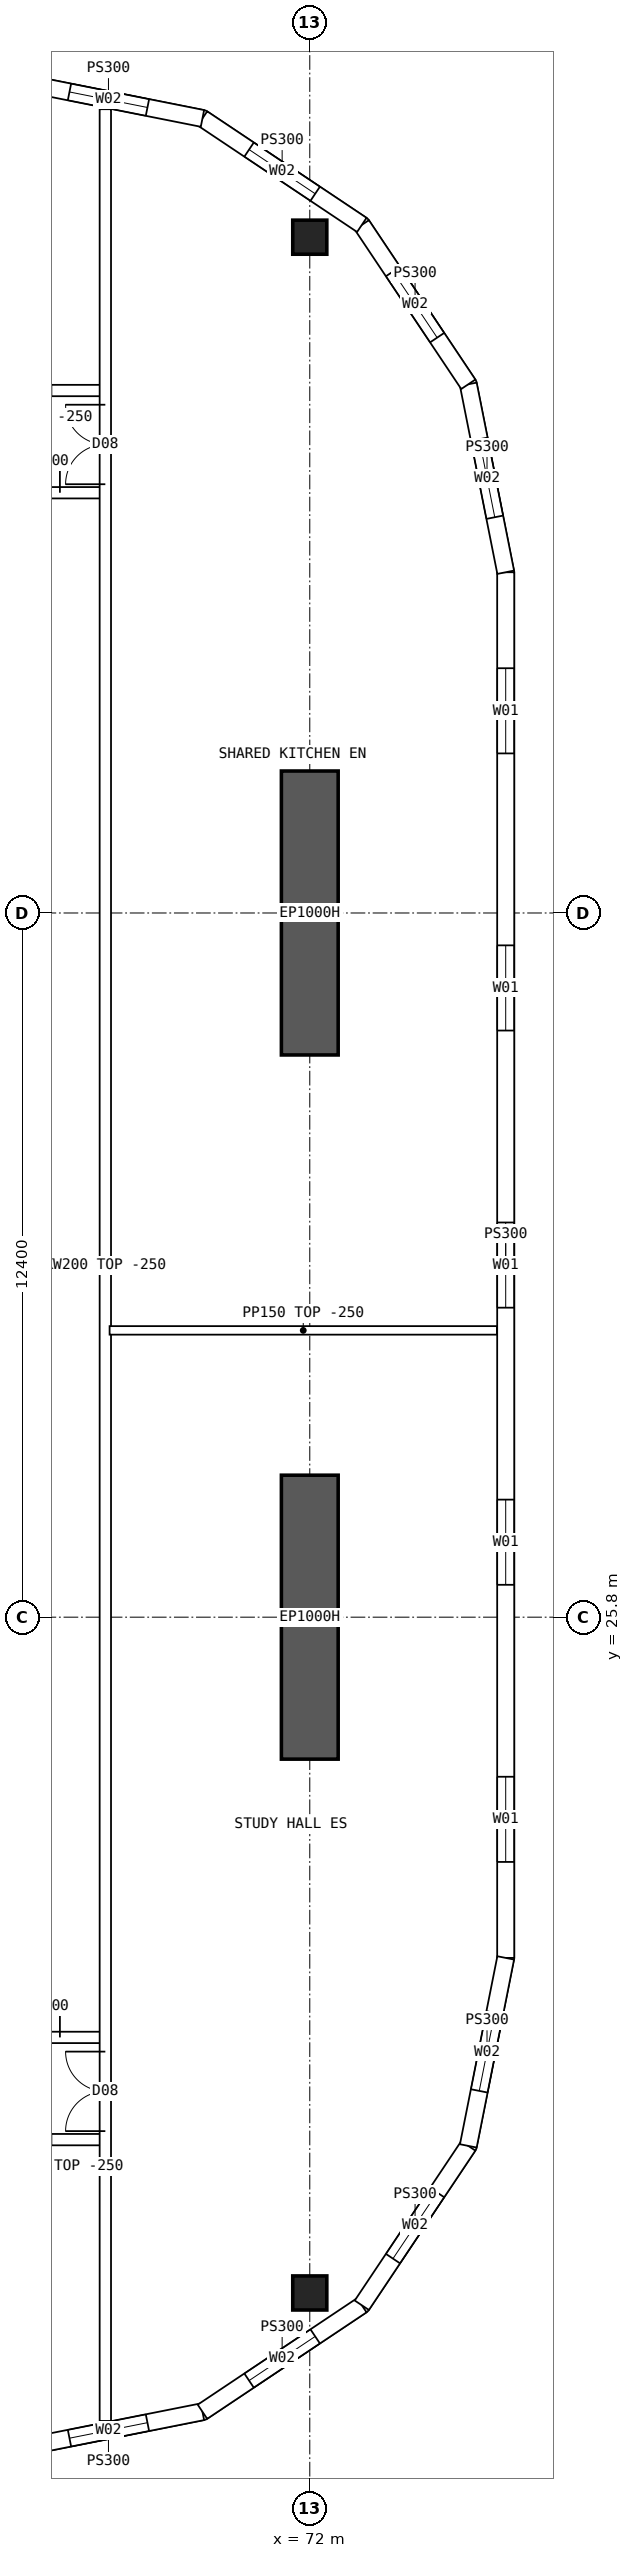
"""IFC4 building model, lengths in metres.
Left out: names, types, materials, properties, quantities, classifications, styles, units other than length and angle.
Written with IfcOpenShell. Run it as: python <this file> out.ifc"""

import sys

from ifc_helpers import new_model, si_unit, direction, frame, frame_2d, origin, origin_2d, place, context, subcontext, project, spatial, polyline, rectangle, hollow_rectangle, outline, extrude, element, fill, save


model = new_model("IFC4")
c1 = context("Model", 3, precision=1e-05, world=origin(), true_north=direction((0.0, 1.0)))
c2 = subcontext(c1, "Body", "Model", "MODEL_VIEW")
j1 = project(units=[si_unit("LENGTHUNIT", "METRE"), si_unit("PLANEANGLEUNIT", "RADIAN")], contexts=[c1])
p1 = place(None, origin())
s1 = spatial("IfcSite", under=j1, at=p1, CompositionType="ELEMENT")
p2 = place(p1, origin())
s2 = spatial("IfcBuilding", under=s1, at=p2, CompositionType="ELEMENT")
p3 = place(p2, frame((0.0, 0.0, 246.55)))
s3 = spatial("IfcBuildingStorey", under=s2, at=p3, CompositionType="ELEMENT", Elevation=246.55)
for number, where, z_axis, x_axis in (
    (1, (72.0, 13.9, 0.0), (0.0, 0.0, 1.0), (1.0, 0.0, 0.0)),
    (2, (72.0, 50.1, 0.0), (0.0, 0.0, 1.0), (1.0, 0.0, 0.0)),
):
    element("IfcColumn", number, at=place(p3, frame(where, z_axis=z_axis, x_axis=x_axis)), inside=s3, PredefinedType="COLUMN", context=c2, shape_type="SweptSolid", body=[
        extrude(hollow_rectangle(XDim=0.6, YDim=0.6, WallThickness=0.06, at=origin_2d()), origin(), (0.0, 0.0, 1.0), 3.75),
    ])
for number, where, z_axis, x_axis in (
    (3, (72.0, 23.3, 0.0), (0.0, 0.0, 1.0), (0.0, 1.0, 0.0)),
    (4, (72.0, 35.7, 0.0), (0.0, 0.0, 1.0), (0.0, 1.0, 0.0)),
):
    element("IfcWall", number, at=place(p3, frame(where, z_axis=z_axis, x_axis=x_axis)), inside=s3, PredefinedType="SHEAR", context=c2, shape_type="SweptSolid", body=[
        extrude(rectangle(XDim=5.0, YDim=1.0, at=frame_2d((2.5, 0.0))), origin(), (0.0, 0.0, 1.0), 3.75),
    ])
p4 = place(p3, frame((75.45, 19.8, 0.0), z_axis=(0.0, 0.0, 1.0), x_axis=(0.0, 1.0, 0.0)))
e5 = element("IfcWall", 5, at=p4, inside=s3, PredefinedType="SOLIDWALL", context=c2, shape_type="SweptSolid", body=[
    extrude(outline(polyline([(-0.015, -0.15), (24.415, -0.15), (24.385, 0.15), (0.015, 0.15), (-0.015, -0.15)])), origin(), (0.0, 0.0, 1.0), 3.5),
])
p5 = place(p4, frame((1.69, 0.0, 0.9)))
e6 = element("IfcOpeningElement", 6, at=p5, cuts=e5, PredefinedType="OPENING", context=c2, shape_type="SweptSolid", body=[
    extrude(rectangle(XDim=1.5, YDim=2.0, at=frame_2d((0.75, 1.0))), frame((0.0, 0.16, 0.0), z_axis=(0.0, -1.0, 0.0), x_axis=(1.0, 0.0, 0.0)), (0.0, 0.0, 1.0), 0.32),
])
p6 = place(p4, frame((6.57, 0.0, 0.9)))
e7 = element("IfcOpeningElement", 7, at=p6, cuts=e5, PredefinedType="OPENING", context=c2, shape_type="SweptSolid", body=[
    extrude(rectangle(XDim=1.5, YDim=2.0, at=frame_2d((0.75, 1.0))), frame((0.0, 0.16, 0.0), z_axis=(0.0, -1.0, 0.0), x_axis=(1.0, 0.0, 0.0)), (0.0, 0.0, 1.0), 0.32),
])
p7 = place(p4, frame((11.45, 0.0, 0.9)))
e8 = element("IfcOpeningElement", 8, at=p7, cuts=e5, PredefinedType="OPENING", context=c2, shape_type="SweptSolid", body=[
    extrude(rectangle(XDim=1.5, YDim=2.0, at=frame_2d((0.75, 1.0))), frame((0.0, 0.16, 0.0), z_axis=(0.0, -1.0, 0.0), x_axis=(1.0, 0.0, 0.0)), (0.0, 0.0, 1.0), 0.32),
])
p8 = place(p4, frame((16.33, 0.0, 0.9)))
e9 = element("IfcOpeningElement", 9, at=p8, cuts=e5, PredefinedType="OPENING", context=c2, shape_type="SweptSolid", body=[
    extrude(rectangle(XDim=1.5, YDim=2.0, at=frame_2d((0.75, 1.0))), frame((0.0, 0.16, 0.0), z_axis=(0.0, -1.0, 0.0), x_axis=(1.0, 0.0, 0.0)), (0.0, 0.0, 1.0), 0.32),
])
p9 = place(p4, frame((21.21, 0.0, 0.9)))
e10 = element("IfcOpeningElement", 10, at=p9, cuts=e5, PredefinedType="OPENING", context=c2, shape_type="SweptSolid", body=[
    extrude(rectangle(XDim=1.5, YDim=2.0, at=frame_2d((0.75, 1.0))), frame((0.0, 0.16, 0.0), z_axis=(0.0, -1.0, 0.0), x_axis=(1.0, 0.0, 0.0)), (0.0, 0.0, 1.0), 0.32),
])
p10 = place(p3, frame((66.8, 11.15, 0.0), z_axis=(0.0, 0.0, 1.0), x_axis=(0.98078325777, 0.195100490205, 0.0)))
e11 = element("IfcWall", 11, at=p10, inside=s3, PredefinedType="SOLIDWALL", context=c2, shape_type="SweptSolid", body=[
    extrude(outline(polyline([(-0.03, -0.15), (3.405, -0.15), (3.345, 0.15), (0.03, 0.15), (-0.03, -0.15)])), origin(), (0.0, 0.0, 1.0), 3.5),
])
p11 = place(p10, frame((0.988, 0.0, 0.9)))
e12 = element("IfcOpeningElement", 12, at=p11, cuts=e11, PredefinedType="OPENING", context=c2, shape_type="SweptSolid", body=[
    extrude(rectangle(XDim=1.4, YDim=1.8, at=frame_2d((0.7, 0.9))), frame((0.0, 0.16, 0.0), z_axis=(0.0, -1.0, 0.0), x_axis=(1.0, 0.0, 0.0)), (0.0, 0.0, 1.0), 0.32),
])
p12 = place(p3, frame((70.11, 11.808, 0.0), z_axis=(0.0, 0.0, 1.0), x_axis=(0.831460037396, 0.555584562613, 0.0)))
e13 = element("IfcWall", 13, at=p12, inside=s3, PredefinedType="SOLIDWALL", context=c2, shape_type="SweptSolid", body=[
    extrude(outline(polyline([(-0.03, -0.15), (3.405, -0.15), (3.345, 0.15), (0.03, 0.15), (-0.03, -0.15)])), origin(), (0.0, 0.0, 1.0), 3.5),
])
p13 = place(p12, frame((0.988, 0.0, 0.9)))
e14 = element("IfcOpeningElement", 14, at=p13, cuts=e13, PredefinedType="OPENING", context=c2, shape_type="SweptSolid", body=[
    extrude(rectangle(XDim=1.4, YDim=1.8, at=frame_2d((0.7, 0.9))), frame((0.0, 0.16, 0.0), z_axis=(0.0, -1.0, 0.0), x_axis=(1.0, 0.0, 0.0)), (0.0, 0.0, 1.0), 0.32),
])
p14 = place(p3, frame((72.917, 13.684, 0.0), z_axis=(0.0, 0.0, 1.0), x_axis=(0.555567969291, 0.831471124873, 0.0)))
e15 = element("IfcWall", 15, at=p14, inside=s3, PredefinedType="SOLIDWALL", context=c2, shape_type="SweptSolid", body=[
    extrude(outline(polyline([(-0.03, -0.15), (3.405, -0.15), (3.345, 0.15), (0.03, 0.15), (-0.03, -0.15)])), origin(), (0.0, 0.0, 1.0), 3.5),
])
p15 = place(p14, frame((0.988, 0.0, 0.9)))
e16 = element("IfcOpeningElement", 16, at=p15, cuts=e15, PredefinedType="OPENING", context=c2, shape_type="SweptSolid", body=[
    extrude(rectangle(XDim=1.4, YDim=1.8, at=frame_2d((0.7, 0.9))), frame((0.0, 0.16, 0.0), z_axis=(0.0, -1.0, 0.0), x_axis=(1.0, 0.0, 0.0)), (0.0, 0.0, 1.0), 0.32),
])
p16 = place(p3, frame((74.792, 16.49, 0.0), z_axis=(0.0, 0.0, 1.0), x_axis=(0.19508664885, 0.980786011034, 0.0)))
e17 = element("IfcWall", 17, at=p16, inside=s3, PredefinedType="SOLIDWALL", context=c2, shape_type="SweptSolid", body=[
    extrude(outline(polyline([(-0.03, -0.15), (3.39, -0.15), (3.36, 0.15), (0.03, 0.15), (-0.03, -0.15)])), origin(), (0.0, 0.0, 1.0), 3.5),
])
p17 = place(p16, frame((0.988, 0.0, 0.9)))
e18 = element("IfcOpeningElement", 18, at=p17, cuts=e17, PredefinedType="OPENING", context=c2, shape_type="SweptSolid", body=[
    extrude(rectangle(XDim=1.4, YDim=1.8, at=frame_2d((0.7, 0.9))), frame((0.0, 0.16, 0.0), z_axis=(0.0, -1.0, 0.0), x_axis=(1.0, 0.0, 0.0)), (0.0, 0.0, 1.0), 0.32),
])
p18 = place(p3, frame((75.45, 44.2, 0.0), z_axis=(0.0, 0.0, 1.0), x_axis=(-0.19508664885, 0.980786011034, 0.0)))
e19 = element("IfcWall", 19, at=p18, inside=s3, PredefinedType="SOLIDWALL", context=c2, shape_type="SweptSolid", body=[
    extrude(outline(polyline([(-0.015, -0.15), (3.405, -0.15), (3.345, 0.15), (0.015, 0.15), (-0.015, -0.15)])), origin(), (0.0, 0.0, 1.0), 3.5),
])
p19 = place(p18, frame((0.988, 0.0, 0.9)))
e20 = element("IfcOpeningElement", 20, at=p19, cuts=e19, PredefinedType="OPENING", context=c2, shape_type="SweptSolid", body=[
    extrude(rectangle(XDim=1.4, YDim=1.8, at=frame_2d((0.7, 0.9))), frame((0.0, 0.16, 0.0), z_axis=(0.0, -1.0, 0.0), x_axis=(1.0, 0.0, 0.0)), (0.0, 0.0, 1.0), 0.32),
])
p20 = place(p3, frame((74.792, 47.51, 0.0), z_axis=(0.0, 0.0, 1.0), x_axis=(-0.555567969291, 0.831471124873, 0.0)))
e21 = element("IfcWall", 21, at=p20, inside=s3, PredefinedType="SOLIDWALL", context=c2, shape_type="SweptSolid", body=[
    extrude(outline(polyline([(-0.03, -0.15), (3.405, -0.15), (3.345, 0.15), (0.03, 0.15), (-0.03, -0.15)])), origin(), (0.0, 0.0, 1.0), 3.5),
])
p21 = place(p20, frame((0.988, 0.0, 0.9)))
e22 = element("IfcOpeningElement", 22, at=p21, cuts=e21, PredefinedType="OPENING", context=c2, shape_type="SweptSolid", body=[
    extrude(rectangle(XDim=1.4, YDim=1.8, at=frame_2d((0.7, 0.9))), frame((0.0, 0.16, 0.0), z_axis=(0.0, -1.0, 0.0), x_axis=(1.0, 0.0, 0.0)), (0.0, 0.0, 1.0), 0.32),
])
p22 = place(p3, frame((72.917, 50.316, 0.0), z_axis=(0.0, 0.0, 1.0), x_axis=(-0.831460037396, 0.555584562613, 0.0)))
e23 = element("IfcWall", 23, at=p22, inside=s3, PredefinedType="SOLIDWALL", context=c2, shape_type="SweptSolid", body=[
    extrude(outline(polyline([(-0.03, -0.15), (3.405, -0.15), (3.345, 0.15), (0.03, 0.15), (-0.03, -0.15)])), origin(), (0.0, 0.0, 1.0), 3.5),
])
p23 = place(p22, frame((0.988, 0.0, 0.9)))
e24 = element("IfcOpeningElement", 24, at=p23, cuts=e23, PredefinedType="OPENING", context=c2, shape_type="SweptSolid", body=[
    extrude(rectangle(XDim=1.4, YDim=1.8, at=frame_2d((0.7, 0.9))), frame((0.0, 0.16, 0.0), z_axis=(0.0, -1.0, 0.0), x_axis=(1.0, 0.0, 0.0)), (0.0, 0.0, 1.0), 0.32),
])
p24 = place(p3, frame((70.11, 52.192, 0.0), z_axis=(0.0, 0.0, 1.0), x_axis=(-0.98078325777, 0.195100490205, 0.0)))
e25 = element("IfcWall", 25, at=p24, inside=s3, PredefinedType="SOLIDWALL", context=c2, shape_type="SweptSolid", body=[
    extrude(outline(polyline([(-0.03, -0.15), (3.405, -0.15), (3.345, 0.15), (0.03, 0.15), (-0.03, -0.15)])), origin(), (0.0, 0.0, 1.0), 3.5),
])
p25 = place(p24, frame((0.988, 0.0, 0.9)))
e26 = element("IfcOpeningElement", 26, at=p25, cuts=e25, PredefinedType="OPENING", context=c2, shape_type="SweptSolid", body=[
    extrude(rectangle(XDim=1.4, YDim=1.8, at=frame_2d((0.7, 0.9))), frame((0.0, 0.16, 0.0), z_axis=(0.0, -1.0, 0.0), x_axis=(1.0, 0.0, 0.0)), (0.0, 0.0, 1.0), 0.32),
])
p26 = place(p3, frame((66.35, 16.6, 0.0), z_axis=(0.0, 0.0, 1.0), x_axis=(1.0, 0.0, 0.0)))
e27 = element("IfcWall", 27, at=p26, inside=s3, PredefinedType="SOLIDWALL", context=c2, shape_type="SweptSolid", body=[
    extrude(rectangle(XDim=2.05, YDim=0.2, at=frame_2d((1.025, 0.0))), origin(), (0.0, 0.0, 1.0), 3.5),
])
p27 = place(p26, frame((0.2, 0.0, 0.0)))
e28 = element("IfcOpeningElement", 28, at=p27, cuts=e27, PredefinedType="OPENING", context=c2, shape_type="SweptSolid", body=[
    extrude(rectangle(XDim=0.9, YDim=2.1, at=frame_2d((0.45, 1.05))), frame((0.0, 0.11, 0.0), z_axis=(0.0, -1.0, 0.0), x_axis=(1.0, 0.0, 0.0)), (0.0, 0.0, 1.0), 0.22),
])
p28 = place(p3, frame((66.35, 18.4, 0.0), z_axis=(0.0, 0.0, 1.0), x_axis=(1.0, 0.0, 0.0)))
e29 = element("IfcWall", 29, at=p28, inside=s3, PredefinedType="SOLIDWALL", context=c2, shape_type="SweptSolid", body=[
    extrude(rectangle(XDim=2.05, YDim=0.2, at=frame_2d((1.025, 0.0))), origin(), (0.0, 0.0, 1.0), 3.5),
])
p29 = place(p28, frame((0.05, 0.0, 0.0)))
e30 = element("IfcOpeningElement", 30, at=p29, cuts=e29, PredefinedType="OPENING", context=c2, shape_type="SweptSolid", body=[
    extrude(rectangle(XDim=1.2, YDim=2.1, at=frame_2d((0.6, 1.05))), frame((0.0, 0.11, 0.0), z_axis=(0.0, -1.0, 0.0), x_axis=(1.0, 0.0, 0.0)), (0.0, 0.0, 1.0), 0.22),
])
p30 = place(p3, frame((66.35, 47.4, 0.0), z_axis=(0.0, 0.0, 1.0), x_axis=(1.0, 0.0, 0.0)))
e31 = element("IfcWall", 31, at=p30, inside=s3, PredefinedType="SOLIDWALL", context=c2, shape_type="SweptSolid", body=[
    extrude(rectangle(XDim=2.05, YDim=0.2, at=frame_2d((1.025, 0.0))), origin(), (0.0, 0.0, 1.0), 3.5),
])
p31 = place(p30, frame((0.2, 0.0, 0.0)))
e32 = element("IfcOpeningElement", 32, at=p31, cuts=e31, PredefinedType="OPENING", context=c2, shape_type="SweptSolid", body=[
    extrude(rectangle(XDim=0.9, YDim=2.1, at=frame_2d((0.45, 1.05))), frame((0.0, 0.11, 0.0), z_axis=(0.0, -1.0, 0.0), x_axis=(1.0, 0.0, 0.0)), (0.0, 0.0, 1.0), 0.22),
])
p32 = place(p3, frame((66.35, 45.6, 0.0), z_axis=(0.0, 0.0, 1.0), x_axis=(1.0, 0.0, 0.0)))
e33 = element("IfcWall", 33, at=p32, inside=s3, PredefinedType="SOLIDWALL", context=c2, shape_type="SweptSolid", body=[
    extrude(rectangle(XDim=2.05, YDim=0.2, at=frame_2d((1.025, 0.0))), origin(), (0.0, 0.0, 1.0), 3.5),
])
p33 = place(p32, frame((0.05, 0.0, 0.0)))
e34 = element("IfcOpeningElement", 34, at=p33, cuts=e33, PredefinedType="OPENING", context=c2, shape_type="SweptSolid", body=[
    extrude(rectangle(XDim=1.2, YDim=2.1, at=frame_2d((0.6, 1.05))), frame((0.0, 0.11, 0.0), z_axis=(0.0, -1.0, 0.0), x_axis=(1.0, 0.0, 0.0)), (0.0, 0.0, 1.0), 0.22),
])
p34 = place(p3, frame((68.475, 30.85, 0.0), z_axis=(0.0, 0.0, 1.0), x_axis=(1.0, 0.0, 0.0)))
e35 = element("IfcWall", 35, at=p34, inside=s3, PredefinedType="PARTITIONING", context=c2, shape_type="SweptSolid", body=[
    extrude(outline(polyline([(0.0, 0.0), (6.82, 0.0), (6.82, 3.5), (3.827, 3.5), (3.825, 3.05), (3.227, 3.05), (3.225, 3.5), (0.0, 3.5), (0.0, 0.0)])), frame((0.0, 0.075, 0.0), z_axis=(0.0, -1.0, 0.0), x_axis=(1.0, 0.0, 0.0)), (0.0, 0.0, 1.0), 0.15),
])
p35 = place(p3, frame((68.4, 11.646, 0.0), z_axis=(0.0, 0.0, 1.0), x_axis=(0.0, 1.0, 0.0)))
e36 = element("IfcWall", 36, at=p35, inside=s3, PredefinedType="SOLIDWALL", context=c2, shape_type="SweptSolid", body=[
    extrude(rectangle(XDim=40.708, YDim=0.2, at=frame_2d((20.354, 0.0))), origin(), (0.0, 0.0, 1.0), 3.5),
])
p36 = place(p35, frame((5.104, 0.0, 0.0)))
e37 = element("IfcOpeningElement", 37, at=p36, cuts=e36, PredefinedType="OPENING", context=c2, shape_type="SweptSolid", body=[
    extrude(rectangle(XDim=1.4, YDim=2.1, at=frame_2d((0.7, 1.05))), frame((0.0, 0.11, 0.0), z_axis=(0.0, -1.0, 0.0), x_axis=(1.0, 0.0, 0.0)), (0.0, 0.0, 1.0), 0.22),
])
p37 = place(p35, frame((34.104, 0.0, 0.0)))
e38 = element("IfcOpeningElement", 38, at=p37, cuts=e36, PredefinedType="OPENING", context=c2, shape_type="SweptSolid", body=[
    extrude(rectangle(XDim=1.4, YDim=2.1, at=frame_2d((0.7, 1.05))), frame((0.0, 0.11, 0.0), z_axis=(0.0, -1.0, 0.0), x_axis=(1.0, 0.0, 0.0)), (0.0, 0.0, 1.0), 0.22),
])
p38 = place(p5, origin())
e39 = element("IfcWindow", 39, at=p38, inside=s3, PartitioningType="SINGLE_PANEL", PredefinedType="WINDOW", context=c2, shape_type="SweptSolid", body=[
    extrude(rectangle(XDim=1.5, YDim=2.0, at=frame_2d((0.75, 1.0))), frame((0.0, 0.03, 0.0), z_axis=(0.0, -1.0, 0.0), x_axis=(1.0, 0.0, 0.0)), (0.0, 0.0, 1.0), 0.06),
])
fill(e6, e39)
p39 = place(p6, origin())
e40 = element("IfcWindow", 40, at=p39, inside=s3, PartitioningType="SINGLE_PANEL", PredefinedType="WINDOW", context=c2, shape_type="SweptSolid", body=[
    extrude(rectangle(XDim=1.5, YDim=2.0, at=frame_2d((0.75, 1.0))), frame((0.0, 0.03, 0.0), z_axis=(0.0, -1.0, 0.0), x_axis=(1.0, 0.0, 0.0)), (0.0, 0.0, 1.0), 0.06),
])
fill(e7, e40)
p40 = place(p7, origin())
e41 = element("IfcWindow", 41, at=p40, inside=s3, PartitioningType="SINGLE_PANEL", PredefinedType="WINDOW", context=c2, shape_type="SweptSolid", body=[
    extrude(rectangle(XDim=1.5, YDim=2.0, at=frame_2d((0.75, 1.0))), frame((0.0, 0.03, 0.0), z_axis=(0.0, -1.0, 0.0), x_axis=(1.0, 0.0, 0.0)), (0.0, 0.0, 1.0), 0.06),
])
fill(e8, e41)
p41 = place(p8, origin())
e42 = element("IfcWindow", 42, at=p41, inside=s3, PartitioningType="SINGLE_PANEL", PredefinedType="WINDOW", context=c2, shape_type="SweptSolid", body=[
    extrude(rectangle(XDim=1.5, YDim=2.0, at=frame_2d((0.75, 1.0))), frame((0.0, 0.03, 0.0), z_axis=(0.0, -1.0, 0.0), x_axis=(1.0, 0.0, 0.0)), (0.0, 0.0, 1.0), 0.06),
])
fill(e9, e42)
p42 = place(p9, origin())
e43 = element("IfcWindow", 43, at=p42, inside=s3, PartitioningType="SINGLE_PANEL", PredefinedType="WINDOW", context=c2, shape_type="SweptSolid", body=[
    extrude(rectangle(XDim=1.5, YDim=2.0, at=frame_2d((0.75, 1.0))), frame((0.0, 0.03, 0.0), z_axis=(0.0, -1.0, 0.0), x_axis=(1.0, 0.0, 0.0)), (0.0, 0.0, 1.0), 0.06),
])
fill(e10, e43)
p43 = place(p11, origin())
e44 = element("IfcWindow", 44, at=p43, inside=s3, PartitioningType="SINGLE_PANEL", PredefinedType="WINDOW", context=c2, shape_type="SweptSolid", body=[
    extrude(rectangle(XDim=1.4, YDim=1.8, at=frame_2d((0.7, 0.9))), frame((0.0, 0.03, 0.0), z_axis=(0.0, -1.0, 0.0), x_axis=(1.0, 0.0, 0.0)), (0.0, 0.0, 1.0), 0.06),
])
fill(e12, e44)
p44 = place(p13, origin())
e45 = element("IfcWindow", 45, at=p44, inside=s3, PartitioningType="SINGLE_PANEL", PredefinedType="WINDOW", context=c2, shape_type="SweptSolid", body=[
    extrude(rectangle(XDim=1.4, YDim=1.8, at=frame_2d((0.7, 0.9))), frame((0.0, 0.03, 0.0), z_axis=(0.0, -1.0, 0.0), x_axis=(1.0, 0.0, 0.0)), (0.0, 0.0, 1.0), 0.06),
])
fill(e14, e45)
p45 = place(p15, origin())
e46 = element("IfcWindow", 46, at=p45, inside=s3, PartitioningType="SINGLE_PANEL", PredefinedType="WINDOW", context=c2, shape_type="SweptSolid", body=[
    extrude(rectangle(XDim=1.4, YDim=1.8, at=frame_2d((0.7, 0.9))), frame((0.0, 0.03, 0.0), z_axis=(0.0, -1.0, 0.0), x_axis=(1.0, 0.0, 0.0)), (0.0, 0.0, 1.0), 0.06),
])
fill(e16, e46)
p46 = place(p17, origin())
e47 = element("IfcWindow", 47, at=p46, inside=s3, PartitioningType="SINGLE_PANEL", PredefinedType="WINDOW", context=c2, shape_type="SweptSolid", body=[
    extrude(rectangle(XDim=1.4, YDim=1.8, at=frame_2d((0.7, 0.9))), frame((0.0, 0.03, 0.0), z_axis=(0.0, -1.0, 0.0), x_axis=(1.0, 0.0, 0.0)), (0.0, 0.0, 1.0), 0.06),
])
fill(e18, e47)
p47 = place(p19, origin())
e48 = element("IfcWindow", 48, at=p47, inside=s3, PartitioningType="SINGLE_PANEL", PredefinedType="WINDOW", context=c2, shape_type="SweptSolid", body=[
    extrude(rectangle(XDim=1.4, YDim=1.8, at=frame_2d((0.7, 0.9))), frame((0.0, 0.03, 0.0), z_axis=(0.0, -1.0, 0.0), x_axis=(1.0, 0.0, 0.0)), (0.0, 0.0, 1.0), 0.06),
])
fill(e20, e48)
p48 = place(p21, origin())
e49 = element("IfcWindow", 49, at=p48, inside=s3, PartitioningType="SINGLE_PANEL", PredefinedType="WINDOW", context=c2, shape_type="SweptSolid", body=[
    extrude(rectangle(XDim=1.4, YDim=1.8, at=frame_2d((0.7, 0.9))), frame((0.0, 0.03, 0.0), z_axis=(0.0, -1.0, 0.0), x_axis=(1.0, 0.0, 0.0)), (0.0, 0.0, 1.0), 0.06),
])
fill(e22, e49)
p49 = place(p23, origin())
e50 = element("IfcWindow", 50, at=p49, inside=s3, PartitioningType="SINGLE_PANEL", PredefinedType="WINDOW", context=c2, shape_type="SweptSolid", body=[
    extrude(rectangle(XDim=1.4, YDim=1.8, at=frame_2d((0.7, 0.9))), frame((0.0, 0.03, 0.0), z_axis=(0.0, -1.0, 0.0), x_axis=(1.0, 0.0, 0.0)), (0.0, 0.0, 1.0), 0.06),
])
fill(e24, e50)
p50 = place(p25, origin())
e51 = element("IfcWindow", 51, at=p50, inside=s3, PartitioningType="SINGLE_PANEL", PredefinedType="WINDOW", context=c2, shape_type="SweptSolid", body=[
    extrude(rectangle(XDim=1.4, YDim=1.8, at=frame_2d((0.7, 0.9))), frame((0.0, 0.03, 0.0), z_axis=(0.0, -1.0, 0.0), x_axis=(1.0, 0.0, 0.0)), (0.0, 0.0, 1.0), 0.06),
])
fill(e26, e51)
p51 = place(p29, origin())
e52 = element("IfcDoor", 52, at=p51, inside=s3, OperationType="DOUBLE_DOOR_SINGLE_SWING", PredefinedType="DOOR", context=c2, shape_type="SweptSolid", body=[
    extrude(rectangle(XDim=1.2, YDim=2.1, at=frame_2d((0.6, 1.05))), frame((0.0, 0.025, 0.0), z_axis=(0.0, -1.0, 0.0), x_axis=(1.0, 0.0, 0.0)), (0.0, 0.0, 1.0), 0.05),
])
fill(e30, e52)
p52 = place(p33, origin())
e53 = element("IfcDoor", 53, at=p52, inside=s3, OperationType="DOUBLE_DOOR_SINGLE_SWING", PredefinedType="DOOR", context=c2, shape_type="SweptSolid", body=[
    extrude(rectangle(XDim=1.2, YDim=2.1, at=frame_2d((0.6, 1.05))), frame((0.0, 0.025, 0.0), z_axis=(0.0, -1.0, 0.0), x_axis=(1.0, 0.0, 0.0)), (0.0, 0.0, 1.0), 0.05),
])
fill(e34, e53)
p53 = place(p36, origin())
e54 = element("IfcDoor", 54, at=p53, inside=s3, OperationType="DOUBLE_DOOR_SINGLE_SWING", PredefinedType="DOOR", context=c2, shape_type="SweptSolid", body=[
    extrude(rectangle(XDim=1.4, YDim=2.1, at=frame_2d((0.7, 1.05))), frame((0.0, 0.025, 0.0), z_axis=(0.0, -1.0, 0.0), x_axis=(1.0, 0.0, 0.0)), (0.0, 0.0, 1.0), 0.05),
])
fill(e37, e54)
p54 = place(p37, origin())
e55 = element("IfcDoor", 55, at=p54, inside=s3, OperationType="DOUBLE_DOOR_SINGLE_SWING", PredefinedType="DOOR", context=c2, shape_type="SweptSolid", body=[
    extrude(rectangle(XDim=1.4, YDim=2.1, at=frame_2d((0.7, 1.05))), frame((0.0, 0.025, 0.0), z_axis=(0.0, -1.0, 0.0), x_axis=(1.0, 0.0, 0.0)), (0.0, 0.0, 1.0), 0.05),
])
fill(e38, e55)
save(model, sys.argv[1])
